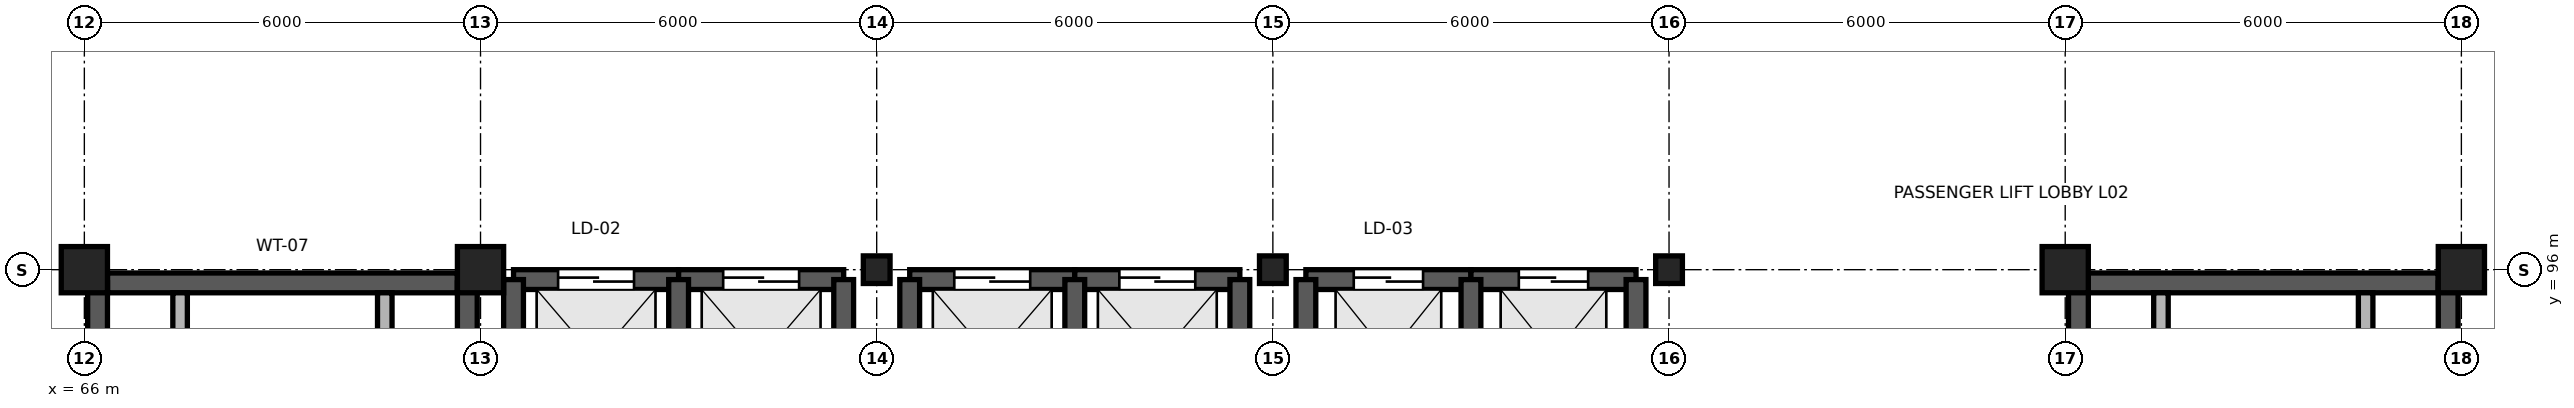
"""IFC4 building model, lengths in metres.
Left out: names, types, materials, properties, quantities, classifications, styles, units other than length and angle.
Written with IfcOpenShell. Run it as: python <this file> out.ifc"""

import sys

from ifc_helpers import new_model, si_unit, direction, frame, frame_2d, origin, origin_2d, place, context, subcontext, project, spatial, rectangle, i_section, extrude, element, fill, save


model = new_model("IFC4")
c1 = context("Model", 3, precision=1e-05, world=origin(), true_north=direction((0.0, 1.0)))
c2 = subcontext(c1, "Body", "Model", "MODEL_VIEW")
j1 = project(units=[si_unit("LENGTHUNIT", "METRE"), si_unit("PLANEANGLEUNIT", "RADIAN")], contexts=[c1])
p1 = place(None, origin())
s1 = spatial("IfcSite", under=j1, at=p1, CompositionType="ELEMENT")
p2 = place(p1, origin())
s2 = spatial("IfcBuilding", under=s1, at=p2, CompositionType="ELEMENT")
p3 = place(p2, frame((0.0, 0.0, 6.0)))
s3 = spatial("IfcBuildingStorey", under=s2, at=p3, CompositionType="ELEMENT", Elevation=6.0)
for number, where, z_axis, x_axis in (
    (1, (66.0, 96.0, 0.0), (0.0, 0.0, 1.0), (1.0, 0.0, 0.0)),
    (2, (72.0, 96.0, 0.0), (0.0, 0.0, 1.0), (1.0, 0.0, 0.0)),
):
    element("IfcColumn", number, at=place(p3, frame(where, z_axis=z_axis, x_axis=x_axis)), inside=s3, PredefinedType="COLUMN", context=c2, shape_type="SweptSolid", body=[
        extrude(rectangle(XDim=0.7, YDim=0.7, at=origin_2d()), origin(), (0.0, 0.0, 1.0), 6.0),
    ])
for number, where, z_axis, x_axis in (
    (3, (78.0, 96.0, 0.0), (0.0, 0.0, 1.0), (1.0, 0.0, 0.0)),
    (4, (84.0, 96.0, 0.0), (0.0, 0.0, 1.0), (1.0, 0.0, 0.0)),
    (5, (90.0, 96.0, 0.0), (0.0, 0.0, 1.0), (1.0, 0.0, 0.0)),
):
    element("IfcColumn", number, at=place(p3, frame(where, z_axis=z_axis, x_axis=x_axis)), inside=s3, PredefinedType="COLUMN", context=c2, shape_type="SweptSolid", body=[
        extrude(i_section(OverallWidth=0.405, OverallDepth=0.418, WebThickness=0.02, FlangeThickness=0.03, FilletRadius=0.022, at=origin_2d()), origin(), (0.0, 0.0, 1.0), 6.0),
    ])
for number, where, z_axis, x_axis in (
    (6, (96.0, 96.0, 0.0), (0.0, 0.0, 1.0), (1.0, 0.0, 0.0)),
    (7, (102.0, 96.0, 0.0), (0.0, 0.0, 1.0), (1.0, 0.0, 0.0)),
):
    element("IfcColumn", number, at=place(p3, frame(where, z_axis=z_axis, x_axis=x_axis)), inside=s3, PredefinedType="COLUMN", context=c2, shape_type="SweptSolid", body=[
        extrude(rectangle(XDim=0.7, YDim=0.7, at=origin_2d()), origin(), (0.0, 0.0, 1.0), 6.0),
    ])
p4 = place(p3, frame((66.35, 95.8, 0.0), z_axis=(0.0, 0.0, 1.0), x_axis=(1.0, 0.0, 0.0)))
e8 = element("IfcWall", 8, at=p4, inside=s3, PredefinedType="SHEAR", context=c2, shape_type="SweptSolid", body=[
    extrude(rectangle(XDim=5.3, YDim=0.3, at=frame_2d((2.65, 0.0))), origin(), (0.0, 0.0, 1.0), 5.76),
])
for number, where, z_axis, x_axis in (
    (9, (66.2, 84.0, 0.0), (0.0, 0.0, 1.0), (0.0, 1.0, 0.0)),
    (10, (71.8, 84.0, 0.0), (0.0, 0.0, 1.0), (0.0, 1.0, 0.0)),
):
    element("IfcWall", number, at=place(p3, frame(where, z_axis=z_axis, x_axis=x_axis)), inside=s3, PredefinedType="SHEAR", context=c2, shape_type="SweptSolid", body=[
        extrude(rectangle(XDim=11.8, YDim=0.3, at=frame_2d((5.9, 0.0))), origin(), (0.0, 0.0, 1.0), 5.76),
    ])
for number, where, z_axis, x_axis in (
    (11, (67.45, 94.4, 0.0), (0.0, 0.0, 1.0), (0.0, 1.0, 0.0)),
    (12, (70.55, 94.4, 0.0), (0.0, 0.0, 1.0), (0.0, 1.0, 0.0)),
):
    element("IfcWall", number, at=place(p3, frame(where, z_axis=z_axis, x_axis=x_axis)), inside=s3, PredefinedType="PARTITIONING", context=c2, shape_type="SweptSolid", body=[
        extrude(rectangle(XDim=1.25, YDim=0.22, at=frame_2d((0.625, 0.0))), origin(), (0.0, 0.0, 1.0), 5.76),
    ])
p5 = place(p3, frame((96.35, 95.8, 0.0), z_axis=(0.0, 0.0, 1.0), x_axis=(1.0, 0.0, 0.0)))
e13 = element("IfcWall", 13, at=p5, inside=s3, PredefinedType="SHEAR", context=c2, shape_type="SweptSolid", body=[
    extrude(rectangle(XDim=5.3, YDim=0.3, at=frame_2d((2.65, 0.0))), origin(), (0.0, 0.0, 1.0), 5.76),
])
for number, where, z_axis, x_axis in (
    (14, (96.2, 84.0, 0.0), (0.0, 0.0, 1.0), (0.0, 1.0, 0.0)),
    (15, (101.8, 84.0, 0.0), (0.0, 0.0, 1.0), (0.0, 1.0, 0.0)),
):
    element("IfcWall", number, at=place(p3, frame(where, z_axis=z_axis, x_axis=x_axis)), inside=s3, PredefinedType="SHEAR", context=c2, shape_type="SweptSolid", body=[
        extrude(rectangle(XDim=11.8, YDim=0.3, at=frame_2d((5.9, 0.0))), origin(), (0.0, 0.0, 1.0), 5.76),
    ])
for number, where, z_axis, x_axis in (
    (16, (97.45, 94.4, 0.0), (0.0, 0.0, 1.0), (0.0, 1.0, 0.0)),
    (17, (100.55, 94.4, 0.0), (0.0, 0.0, 1.0), (0.0, 1.0, 0.0)),
):
    element("IfcWall", number, at=place(p3, frame(where, z_axis=z_axis, x_axis=x_axis)), inside=s3, PredefinedType="PARTITIONING", context=c2, shape_type="SweptSolid", body=[
        extrude(rectangle(XDim=1.25, YDim=0.22, at=frame_2d((0.625, 0.0))), origin(), (0.0, 0.0, 1.0), 5.76),
    ])
p6 = place(p3, frame((72.5, 95.85, 0.0), z_axis=(0.0, 0.0, 1.0), x_axis=(1.0, 0.0, 0.0)))
e18 = element("IfcWall", 18, at=p6, inside=s3, PredefinedType="SHEAR", context=c2, shape_type="SweptSolid", body=[
    extrude(rectangle(XDim=2.5, YDim=0.3, at=frame_2d((1.25, 0.0))), origin(), (0.0, 0.0, 1.0), 5.76),
])
p7 = place(p6, frame((0.675, 0.0, 0.0)))
e19 = element("IfcOpeningElement", 19, at=p7, cuts=e18, PredefinedType="OPENING", context=c2, shape_type="SweptSolid", body=[
    extrude(rectangle(XDim=1.15, YDim=2.15, at=frame_2d((0.575, 1.075))), frame((0.0, 0.165, 0.0), z_axis=(0.0, -1.0, 0.0), x_axis=(1.0, 0.0, 0.0)), (0.0, 0.0, 1.0), 0.33),
])
p8 = place(p3, frame((72.5, 92.45, 0.0), z_axis=(0.0, 0.0, 1.0), x_axis=(0.0, 1.0, 0.0)))
e20 = element("IfcWall", 20, at=p8, inside=s3, PredefinedType="SHEAR", context=c2, shape_type="SweptSolid", body=[
    extrude(rectangle(XDim=3.4, YDim=0.3, at=frame_2d((1.7, 0.0))), origin(), (0.0, 0.0, 1.0), 5.76),
])
p9 = place(p3, frame((75.0, 95.85, 0.0), z_axis=(0.0, 0.0, 1.0), x_axis=(1.0, 0.0, 0.0)))
e21 = element("IfcWall", 21, at=p9, inside=s3, PredefinedType="SHEAR", context=c2, shape_type="SweptSolid", body=[
    extrude(rectangle(XDim=2.5, YDim=0.3, at=frame_2d((1.25, 0.0))), origin(), (0.0, 0.0, 1.0), 5.76),
])
p10 = place(p9, frame((0.675, 0.0, 0.0)))
e22 = element("IfcOpeningElement", 22, at=p10, cuts=e21, PredefinedType="OPENING", context=c2, shape_type="SweptSolid", body=[
    extrude(rectangle(XDim=1.15, YDim=2.15, at=frame_2d((0.575, 1.075))), frame((0.0, 0.165, 0.0), z_axis=(0.0, -1.0, 0.0), x_axis=(1.0, 0.0, 0.0)), (0.0, 0.0, 1.0), 0.33),
])
for number, where, z_axis, x_axis in (
    (23, (75.0, 92.45, 0.0), (0.0, 0.0, 1.0), (0.0, 1.0, 0.0)),
    (24, (77.5, 92.45, 0.0), (0.0, 0.0, 1.0), (0.0, 1.0, 0.0)),
):
    element("IfcWall", number, at=place(p3, frame(where, z_axis=z_axis, x_axis=x_axis)), inside=s3, PredefinedType="SHEAR", context=c2, shape_type="SweptSolid", body=[
        extrude(rectangle(XDim=3.4, YDim=0.3, at=frame_2d((1.7, 0.0))), origin(), (0.0, 0.0, 1.0), 5.76),
    ])
p11 = place(p3, frame((78.5, 95.85, 0.0), z_axis=(0.0, 0.0, 1.0), x_axis=(1.0, 0.0, 0.0)))
e25 = element("IfcWall", 25, at=p11, inside=s3, PredefinedType="SHEAR", context=c2, shape_type="SweptSolid", body=[
    extrude(rectangle(XDim=2.5, YDim=0.3, at=frame_2d((1.25, 0.0))), origin(), (0.0, 0.0, 1.0), 5.76),
])
p12 = place(p11, frame((0.675, 0.0, 0.0)))
e26 = element("IfcOpeningElement", 26, at=p12, cuts=e25, PredefinedType="OPENING", context=c2, shape_type="SweptSolid", body=[
    extrude(rectangle(XDim=1.15, YDim=2.15, at=frame_2d((0.575, 1.075))), frame((0.0, 0.165, 0.0), z_axis=(0.0, -1.0, 0.0), x_axis=(1.0, 0.0, 0.0)), (0.0, 0.0, 1.0), 0.33),
])
p13 = place(p3, frame((78.5, 92.45, 0.0), z_axis=(0.0, 0.0, 1.0), x_axis=(0.0, 1.0, 0.0)))
e27 = element("IfcWall", 27, at=p13, inside=s3, PredefinedType="SHEAR", context=c2, shape_type="SweptSolid", body=[
    extrude(rectangle(XDim=3.4, YDim=0.3, at=frame_2d((1.7, 0.0))), origin(), (0.0, 0.0, 1.0), 5.76),
])
p14 = place(p3, frame((81.0, 95.85, 0.0), z_axis=(0.0, 0.0, 1.0), x_axis=(1.0, 0.0, 0.0)))
e28 = element("IfcWall", 28, at=p14, inside=s3, PredefinedType="SHEAR", context=c2, shape_type="SweptSolid", body=[
    extrude(rectangle(XDim=2.5, YDim=0.3, at=frame_2d((1.25, 0.0))), origin(), (0.0, 0.0, 1.0), 5.76),
])
p15 = place(p14, frame((0.675, 0.0, 0.0)))
e29 = element("IfcOpeningElement", 29, at=p15, cuts=e28, PredefinedType="OPENING", context=c2, shape_type="SweptSolid", body=[
    extrude(rectangle(XDim=1.15, YDim=2.15, at=frame_2d((0.575, 1.075))), frame((0.0, 0.165, 0.0), z_axis=(0.0, -1.0, 0.0), x_axis=(1.0, 0.0, 0.0)), (0.0, 0.0, 1.0), 0.33),
])
for number, where, z_axis, x_axis in (
    (30, (81.0, 92.45, 0.0), (0.0, 0.0, 1.0), (0.0, 1.0, 0.0)),
    (31, (83.5, 92.45, 0.0), (0.0, 0.0, 1.0), (0.0, 1.0, 0.0)),
):
    element("IfcWall", number, at=place(p3, frame(where, z_axis=z_axis, x_axis=x_axis)), inside=s3, PredefinedType="SHEAR", context=c2, shape_type="SweptSolid", body=[
        extrude(rectangle(XDim=3.4, YDim=0.3, at=frame_2d((1.7, 0.0))), origin(), (0.0, 0.0, 1.0), 5.76),
    ])
p16 = place(p3, frame((84.5, 95.85, 0.0), z_axis=(0.0, 0.0, 1.0), x_axis=(1.0, 0.0, 0.0)))
e32 = element("IfcWall", 32, at=p16, inside=s3, PredefinedType="SHEAR", context=c2, shape_type="SweptSolid", body=[
    extrude(rectangle(XDim=2.5, YDim=0.3, at=frame_2d((1.25, 0.0))), origin(), (0.0, 0.0, 1.0), 5.76),
])
p17 = place(p16, frame((0.725, 0.0, 0.0)))
e33 = element("IfcOpeningElement", 33, at=p17, cuts=e32, PredefinedType="OPENING", context=c2, shape_type="SweptSolid", body=[
    extrude(rectangle(XDim=1.05, YDim=2.1, at=frame_2d((0.525, 1.05))), frame((0.0, 0.165, 0.0), z_axis=(0.0, -1.0, 0.0), x_axis=(1.0, 0.0, 0.0)), (0.0, 0.0, 1.0), 0.33),
])
p18 = place(p3, frame((84.5, 92.45, 0.0), z_axis=(0.0, 0.0, 1.0), x_axis=(0.0, 1.0, 0.0)))
e34 = element("IfcWall", 34, at=p18, inside=s3, PredefinedType="SHEAR", context=c2, shape_type="SweptSolid", body=[
    extrude(rectangle(XDim=3.4, YDim=0.3, at=frame_2d((1.7, 0.0))), origin(), (0.0, 0.0, 1.0), 5.76),
])
p19 = place(p3, frame((87.0, 95.85, 0.0), z_axis=(0.0, 0.0, 1.0), x_axis=(1.0, 0.0, 0.0)))
e35 = element("IfcWall", 35, at=p19, inside=s3, PredefinedType="SHEAR", context=c2, shape_type="SweptSolid", body=[
    extrude(rectangle(XDim=2.5, YDim=0.3, at=frame_2d((1.25, 0.0))), origin(), (0.0, 0.0, 1.0), 5.76),
])
p20 = place(p19, frame((0.725, 0.0, 0.0)))
e36 = element("IfcOpeningElement", 36, at=p20, cuts=e35, PredefinedType="OPENING", context=c2, shape_type="SweptSolid", body=[
    extrude(rectangle(XDim=1.05, YDim=2.1, at=frame_2d((0.525, 1.05))), frame((0.0, 0.165, 0.0), z_axis=(0.0, -1.0, 0.0), x_axis=(1.0, 0.0, 0.0)), (0.0, 0.0, 1.0), 0.33),
])
for number, where, z_axis, x_axis in (
    (37, (87.0, 92.45, 0.0), (0.0, 0.0, 1.0), (0.0, 1.0, 0.0)),
    (38, (89.5, 92.45, 0.0), (0.0, 0.0, 1.0), (0.0, 1.0, 0.0)),
):
    element("IfcWall", number, at=place(p3, frame(where, z_axis=z_axis, x_axis=x_axis)), inside=s3, PredefinedType="SHEAR", context=c2, shape_type="SweptSolid", body=[
        extrude(rectangle(XDim=3.4, YDim=0.3, at=frame_2d((1.7, 0.0))), origin(), (0.0, 0.0, 1.0), 5.76),
    ])
p21 = place(p7, origin())
e39 = element("IfcDoor", 39, at=p21, inside=s3, OperationType="DOUBLE_DOOR_SLIDING", PredefinedType="DOOR", context=c2, shape_type="SweptSolid", body=[
    extrude(rectangle(XDim=1.15, YDim=2.15, at=frame_2d((0.575, 1.075))), frame((0.0, 0.025, 0.0), z_axis=(0.0, -1.0, 0.0), x_axis=(1.0, 0.0, 0.0)), (0.0, 0.0, 1.0), 0.05),
])
fill(e19, e39)
p22 = place(p10, origin())
e40 = element("IfcDoor", 40, at=p22, inside=s3, OperationType="DOUBLE_DOOR_SLIDING", PredefinedType="DOOR", context=c2, shape_type="SweptSolid", body=[
    extrude(rectangle(XDim=1.15, YDim=2.15, at=frame_2d((0.575, 1.075))), frame((0.0, 0.025, 0.0), z_axis=(0.0, -1.0, 0.0), x_axis=(1.0, 0.0, 0.0)), (0.0, 0.0, 1.0), 0.05),
])
fill(e22, e40)
p23 = place(p12, origin())
e41 = element("IfcDoor", 41, at=p23, inside=s3, OperationType="DOUBLE_DOOR_SLIDING", PredefinedType="DOOR", context=c2, shape_type="SweptSolid", body=[
    extrude(rectangle(XDim=1.15, YDim=2.15, at=frame_2d((0.575, 1.075))), frame((0.0, 0.025, 0.0), z_axis=(0.0, -1.0, 0.0), x_axis=(1.0, 0.0, 0.0)), (0.0, 0.0, 1.0), 0.05),
])
fill(e26, e41)
p24 = place(p15, origin())
e42 = element("IfcDoor", 42, at=p24, inside=s3, OperationType="DOUBLE_DOOR_SLIDING", PredefinedType="DOOR", context=c2, shape_type="SweptSolid", body=[
    extrude(rectangle(XDim=1.15, YDim=2.15, at=frame_2d((0.575, 1.075))), frame((0.0, 0.025, 0.0), z_axis=(0.0, -1.0, 0.0), x_axis=(1.0, 0.0, 0.0)), (0.0, 0.0, 1.0), 0.05),
])
fill(e29, e42)
p25 = place(p17, origin())
e43 = element("IfcDoor", 43, at=p25, inside=s3, OperationType="DOUBLE_DOOR_SLIDING", PredefinedType="DOOR", context=c2, shape_type="SweptSolid", body=[
    extrude(rectangle(XDim=1.05, YDim=2.1, at=frame_2d((0.525, 1.05))), frame((0.0, 0.025, 0.0), z_axis=(0.0, -1.0, 0.0), x_axis=(1.0, 0.0, 0.0)), (0.0, 0.0, 1.0), 0.05),
])
fill(e33, e43)
p26 = place(p20, origin())
e44 = element("IfcDoor", 44, at=p26, inside=s3, OperationType="DOUBLE_DOOR_SLIDING", PredefinedType="DOOR", context=c2, shape_type="SweptSolid", body=[
    extrude(rectangle(XDim=1.05, YDim=2.1, at=frame_2d((0.525, 1.05))), frame((0.0, 0.025, 0.0), z_axis=(0.0, -1.0, 0.0), x_axis=(1.0, 0.0, 0.0)), (0.0, 0.0, 1.0), 0.05),
])
fill(e36, e44)
save(model, sys.argv[1])
